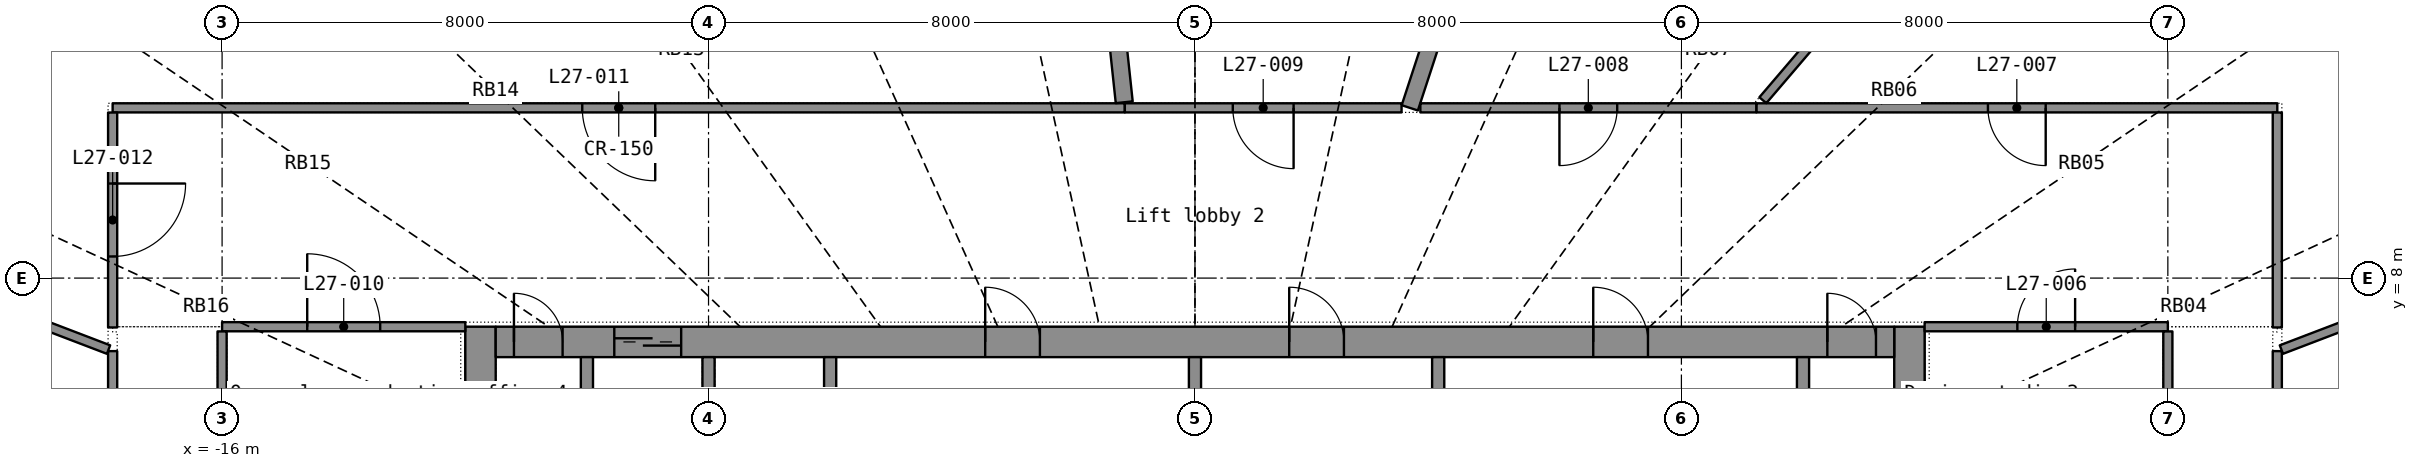
"""IFC4 building model, lengths in metres.
Left out: names, types, materials, properties, quantities, classifications, styles, units other than length and angle.
Written with IfcOpenShell. Run it as: python <this file> out.ifc"""

import sys

from ifc_helpers import new_model, si_unit, direction, frame, frame_2d, origin, place, context, subcontext, project, spatial, rectangle, extrude, element, fill, save


model = new_model("IFC4")
c1 = context("Model", 3, precision=1e-05, world=origin(), true_north=direction((0.0, 1.0)))
c2 = subcontext(c1, "Body", "Model", "MODEL_VIEW")
j1 = project(units=[si_unit("LENGTHUNIT", "METRE"), si_unit("PLANEANGLEUNIT", "RADIAN")], contexts=[c1])
p1 = place(None, origin())
s1 = spatial("IfcSite", under=j1, at=p1, CompositionType="ELEMENT")
p2 = place(p1, origin())
s2 = spatial("IfcBuilding", under=s1, at=p2, CompositionType="ELEMENT")
p3 = place(p2, frame((0.0, 0.0, 115.6)))
s3 = spatial("IfcBuildingStorey", under=s2, at=p3, CompositionType="ELEMENT", Elevation=115.6)
p4 = place(p3, frame((-11.75, -7.2, 0.0), z_axis=(0.0, 0.0, 1.0), x_axis=(0.0, 1.0, 0.0)))
e1 = element("IfcWall", 1, at=p4, inside=s3, PredefinedType="SHEAR", context=c2, shape_type="SweptSolid", body=[
    extrude(rectangle(XDim=14.4, YDim=0.5, at=frame_2d((7.2, 0.0))), origin(), (0.0, 0.0, 1.0), 3.3),
])
p5 = place(p4, frame((6.5, 0.0, 0.0)))
e2 = element("IfcOpeningElement", 2, at=p5, cuts=e1, PredefinedType="OPENING", context=c2, shape_type="SweptSolid", body=[
    extrude(rectangle(XDim=1.4, YDim=2.2, at=frame_2d((0.7, 1.1))), frame((0.0, 0.26, 0.0), z_axis=(0.0, -1.0, 0.0), x_axis=(1.0, 0.0, 0.0)), (0.0, 0.0, 1.0), 0.52),
])
p6 = place(p3, frame((11.75, -7.2, 0.0), z_axis=(0.0, 0.0, 1.0), x_axis=(0.0, 1.0, 0.0)))
e3 = element("IfcWall", 3, at=p6, inside=s3, PredefinedType="SHEAR", context=c2, shape_type="SweptSolid", body=[
    extrude(rectangle(XDim=14.4, YDim=0.5, at=frame_2d((7.2, 0.0))), origin(), (0.0, 0.0, 1.0), 3.3),
])
p7 = place(p6, frame((6.5, 0.0, 0.0)))
e4 = element("IfcOpeningElement", 4, at=p7, cuts=e3, PredefinedType="OPENING", context=c2, shape_type="SweptSolid", body=[
    extrude(rectangle(XDim=1.4, YDim=2.2, at=frame_2d((0.7, 1.1))), frame((0.0, 0.26, 0.0), z_axis=(0.0, -1.0, 0.0), x_axis=(1.0, 0.0, 0.0)), (0.0, 0.0, 1.0), 0.52),
])
p8 = place(p3, frame((-11.5, 6.95, 0.0), z_axis=(0.0, 0.0, 1.0), x_axis=(1.0, 0.0, 0.0)))
e5 = element("IfcWall", 5, at=p8, inside=s3, PredefinedType="SHEAR", context=c2, shape_type="SweptSolid", body=[
    extrude(rectangle(XDim=23.0, YDim=0.5, at=frame_2d((11.5, 0.0))), origin(), (0.0, 0.0, 1.0), 3.3),
])
p9 = place(p8, frame((1.95, 0.0, 0.0)))
e6 = element("IfcOpeningElement", 6, at=p9, cuts=e5, PredefinedType="OPENING", context=c2, shape_type="SweptSolid", body=[
    extrude(rectangle(XDim=1.1, YDim=2.2, at=frame_2d((0.55, 1.1))), frame((0.0, 0.26, 0.0), z_axis=(0.0, -1.0, 0.0), x_axis=(1.0, 0.0, 0.0)), (0.0, 0.0, 1.0), 0.52),
])
p10 = place(p8, frame((8.05, 0.0, 0.0)))
e7 = element("IfcOpeningElement", 7, at=p10, cuts=e5, PredefinedType="OPENING", context=c2, shape_type="SweptSolid", body=[
    extrude(rectangle(XDim=0.9, YDim=2.1, at=frame_2d((0.45, 1.05))), frame((0.0, 0.26, 0.0), z_axis=(0.0, -1.0, 0.0), x_axis=(1.0, 0.0, 0.0)), (0.0, 0.0, 1.0), 0.52),
])
p11 = place(p8, frame((13.05, 0.0, 0.0)))
e8 = element("IfcOpeningElement", 8, at=p11, cuts=e5, PredefinedType="OPENING", context=c2, shape_type="SweptSolid", body=[
    extrude(rectangle(XDim=0.9, YDim=2.1, at=frame_2d((0.45, 1.05))), frame((0.0, 0.26, 0.0), z_axis=(0.0, -1.0, 0.0), x_axis=(1.0, 0.0, 0.0)), (0.0, 0.0, 1.0), 0.52),
])
p12 = place(p8, frame((18.05, 0.0, 0.0)))
e9 = element("IfcOpeningElement", 9, at=p12, cuts=e5, PredefinedType="OPENING", context=c2, shape_type="SweptSolid", body=[
    extrude(rectangle(XDim=0.9, YDim=2.1, at=frame_2d((0.45, 1.05))), frame((0.0, 0.26, 0.0), z_axis=(0.0, -1.0, 0.0), x_axis=(1.0, 0.0, 0.0)), (0.0, 0.0, 1.0), 0.52),
])
p13 = place(p8, frame((0.3, 0.0, 0.0)))
e10 = element("IfcOpeningElement", 10, at=p13, cuts=e5, PredefinedType="OPENING", context=c2, shape_type="SweptSolid", body=[
    extrude(rectangle(XDim=0.8, YDim=2.05, at=frame_2d((0.4, 1.025))), frame((0.0, 0.26, 0.0), z_axis=(0.0, -1.0, 0.0), x_axis=(1.0, 0.0, 0.0)), (0.0, 0.0, 1.0), 0.52),
])
p14 = place(p8, frame((21.9, 0.0, 0.0)))
e11 = element("IfcOpeningElement", 11, at=p14, cuts=e5, PredefinedType="OPENING", context=c2, shape_type="SweptSolid", body=[
    extrude(rectangle(XDim=0.8, YDim=2.05, at=frame_2d((0.4, 1.025))), frame((0.0, 0.26, 0.0), z_axis=(0.0, -1.0, 0.0), x_axis=(1.0, 0.0, 0.0)), (0.0, 0.0, 1.0), 0.52),
])
for number, where, z_axis, x_axis in (
    (12, (-10.0, 3.9, 0.0), (0.0, 0.0, 1.0), (0.0, 1.0, 0.0)),
    (13, (-8.0, 3.9, 0.0), (0.0, 0.0, 1.0), (0.0, 1.0, 0.0)),
    (14, (-6.0, 3.9, 0.0), (0.0, 0.0, 1.0), (0.0, 1.0, 0.0)),
    (15, (10.0, 3.9, 0.0), (0.0, 0.0, 1.0), (0.0, 1.0, 0.0)),
):
    element("IfcWall", number, at=place(p3, frame(where, z_axis=z_axis, x_axis=x_axis)), inside=s3, PredefinedType="SHEAR", context=c2, shape_type="SweptSolid", body=[
        extrude(rectangle(XDim=2.8, YDim=0.2, at=frame_2d((1.4, 0.0))), origin(), (0.0, 0.0, 1.0), 3.3),
    ])
for number, where, z_axis, x_axis in (
    (16, (0.0, 3.9, 0.0), (0.0, 0.0, 1.0), (0.0, 1.0, 0.0)),
    (17, (4.0, 3.9, 0.0), (0.0, 0.0, 1.0), (0.0, 1.0, 0.0)),
):
    element("IfcWall", number, at=place(p3, frame(where, z_axis=z_axis, x_axis=x_axis)), inside=s3, PredefinedType="PARTITIONING", context=c2, shape_type="SweptSolid", body=[
        extrude(rectangle(XDim=2.8, YDim=0.2, at=frame_2d((1.4, 0.0))), origin(), (0.0, 0.0, 1.0), 3.3),
    ])
p15 = place(p3, frame((-1.154, 10.8, 0.0), z_axis=(0.0, 0.0, 1.0), x_axis=(-1.0, 0.0, 0.0)))
e18 = element("IfcWall", 18, at=p15, inside=s3, PredefinedType="PARTITIONING", context=c2, shape_type="SweptSolid", body=[
    extrude(rectangle(XDim=16.646, YDim=0.15, at=frame_2d((8.323, 0.0))), origin(), (0.0, 0.0, 1.0), 2.4),
])
p16 = place(p15, frame((7.723, 0.0, 0.0)))
e19 = element("IfcOpeningElement", 19, at=p16, cuts=e18, PredefinedType="OPENING", context=c2, shape_type="SweptSolid", body=[
    extrude(rectangle(XDim=1.2, YDim=2.2, at=frame_2d((0.6, 1.1))), frame((0.0, 0.085, 0.0), z_axis=(0.0, -1.0, 0.0), x_axis=(1.0, 0.0, 0.0)), (0.0, 0.0, 1.0), 0.17),
])
p17 = place(p3, frame((17.8, -6.799, 0.0), z_axis=(0.0, 0.0, 1.0), x_axis=(0.0, 1.0, 0.0)))
e20 = element("IfcWall", 20, at=p17, inside=s3, PredefinedType="PARTITIONING", context=c2, shape_type="SweptSolid", body=[
    extrude(rectangle(XDim=13.598, YDim=0.15, at=frame_2d((6.799, 0.0))), origin(), (0.0, 0.0, 1.0), 2.4),
])
p18 = place(p17, frame((6.199, 0.0, 0.0)))
e21 = element("IfcOpeningElement", 21, at=p18, cuts=e20, PredefinedType="OPENING", context=c2, shape_type="SweptSolid", body=[
    extrude(rectangle(XDim=1.2, YDim=2.2, at=frame_2d((0.6, 1.1))), frame((0.0, 0.085, 0.0), z_axis=(0.0, -1.0, 0.0), x_axis=(1.0, 0.0, 0.0)), (0.0, 0.0, 1.0), 0.17),
])
p19 = place(p3, frame((-17.8, 6.799, 0.0), z_axis=(0.0, 0.0, 1.0), x_axis=(0.0, -1.0, 0.0)))
e22 = element("IfcWall", 22, at=p19, inside=s3, PredefinedType="PARTITIONING", context=c2, shape_type="SweptSolid", body=[
    extrude(rectangle(XDim=10.706, YDim=0.15, at=frame_2d((5.353, 0.0))), origin(), (0.0, 0.0, 1.0), 2.4),
])
p20 = place(p19, frame((4.753, 0.0, 0.0)))
e23 = element("IfcOpeningElement", 23, at=p20, cuts=e22, PredefinedType="OPENING", context=c2, shape_type="SweptSolid", body=[
    extrude(rectangle(XDim=1.2, YDim=2.2, at=frame_2d((0.6, 1.1))), frame((0.0, 0.085, 0.0), z_axis=(0.0, -1.0, 0.0), x_axis=(1.0, 0.0, 0.0)), (0.0, 0.0, 1.0), 0.17),
])
p21 = place(p3, frame((-2.219, 20.775, 0.0), z_axis=(0.0, 0.0, 1.0), x_axis=(0.106213943, -0.9943433, 0.0)))
e24 = element("IfcWall", 24, at=p21, inside=s3, PredefinedType="PARTITIONING", context=c2, shape_type="SweptSolid", body=[
    extrude(rectangle(XDim=9.939, YDim=0.28, at=frame_2d((4.969, 0.0))), origin(), (0.0, 0.0, 1.0), 2.4),
])
p22 = place(p21, frame((4.219, 0.0, 1.0)))
e25 = element("IfcOpeningElement", 25, at=p22, cuts=e24, PredefinedType="OPENING", context=c2, shape_type="SweptSolid", body=[
    extrude(rectangle(XDim=1.5, YDim=1.2, at=frame_2d((0.75, 0.6))), frame((0.0, 0.15, 0.0), z_axis=(0.0, -1.0, 0.0), x_axis=(1.0, 0.0, 0.0)), (0.0, 0.0, 1.0), 0.3),
])
p23 = place(p3, frame((6.59, 20.144, 0.0), z_axis=(0.0, 0.0, 1.0), x_axis=(-0.310918337, -0.95043663, 0.0)))
e26 = element("IfcWall", 26, at=p23, inside=s3, PredefinedType="PARTITIONING", context=c2, shape_type="SweptSolid", body=[
    extrude(rectangle(XDim=9.831, YDim=0.28, at=frame_2d((4.916, 0.0))), origin(), (0.0, 0.0, 1.0), 2.4),
])
p24 = place(p3, frame((17.8, 10.8, 0.0), z_axis=(0.0, 0.0, 1.0), x_axis=(-1.0, 0.0, 0.0)))
e27 = element("IfcWall", 27, at=p24, inside=s3, PredefinedType="PARTITIONING", context=c2, shape_type="SweptSolid", body=[
    extrude(rectangle(XDim=8.568, YDim=0.15, at=frame_2d((4.284, 0.0))), origin(), (0.0, 0.0, 1.0), 2.4),
])
p25 = place(p24, frame((3.809, 0.0, 0.0)))
e28 = element("IfcOpeningElement", 28, at=p25, cuts=e27, PredefinedType="OPENING", context=c2, shape_type="SweptSolid", body=[
    extrude(rectangle(XDim=0.95, YDim=2.15, at=frame_2d((0.475, 1.075))), frame((0.0, 0.085, 0.0), z_axis=(0.0, -1.0, 0.0), x_axis=(1.0, 0.0, 0.0)), (0.0, 0.0, 1.0), 0.17),
])
p26 = place(p3, frame((14.607, 17.087, 0.0), z_axis=(0.0, 0.0, 1.0), x_axis=(-0.649776378, -0.760125423, 0.0)))
e29 = element("IfcWall", 29, at=p26, inside=s3, PredefinedType="PARTITIONING", context=c2, shape_type="SweptSolid", body=[
    extrude(rectangle(XDim=8.106, YDim=0.15, at=frame_2d((4.053, 0.0))), origin(), (0.0, 0.0, 1.0), 2.4),
])
p27 = place(p3, frame((9.231, 10.8, 0.0), z_axis=(0.0, 0.0, 1.0), x_axis=(-1.0, 0.0, 0.0)))
e30 = element("IfcWall", 30, at=p27, inside=s3, PredefinedType="PARTITIONING", context=c2, shape_type="SweptSolid", body=[
    extrude(rectangle(XDim=5.524, YDim=0.15, at=frame_2d((2.762, 0.0))), origin(), (0.0, 0.0, 1.0), 2.4),
])
p28 = place(p27, frame((2.287, 0.0, 0.0)))
e31 = element("IfcOpeningElement", 31, at=p28, cuts=e30, PredefinedType="OPENING", context=c2, shape_type="SweptSolid", body=[
    extrude(rectangle(XDim=0.95, YDim=2.15, at=frame_2d((0.475, 1.075))), frame((0.0, 0.085, 0.0), z_axis=(0.0, -1.0, 0.0), x_axis=(1.0, 0.0, 0.0)), (0.0, 0.0, 1.0), 0.17),
])
p29 = place(p3, frame((-23.094, 8.821, 0.0), z_axis=(0.0, 0.0, 1.0), x_axis=(0.934174226, -0.356817201, 0.0)))
e32 = element("IfcWall", 32, at=p29, inside=s3, PredefinedType="PARTITIONING", context=c2, shape_type="SweptSolid", body=[
    extrude(rectangle(XDim=5.595, YDim=0.15, at=frame_2d((2.797, 0.0))), origin(), (0.0, 0.0, 1.0), 2.4),
])
p30 = place(p3, frame((23.092, 8.82, 0.0), z_axis=(0.0, 0.0, 1.0), x_axis=(-0.934164423, -0.356842865, 0.0)))
e33 = element("IfcWall", 33, at=p30, inside=s3, PredefinedType="PARTITIONING", context=c2, shape_type="SweptSolid", body=[
    extrude(rectangle(XDim=5.593, YDim=0.15, at=frame_2d((2.796, 0.0))), origin(), (0.0, 0.0, 1.0), 2.4),
])
p31 = place(p3, frame((3.398, 10.8, 0.0), z_axis=(0.0, 0.0, 1.0), x_axis=(-1.0, 0.0, 0.0)))
e34 = element("IfcWall", 34, at=p31, inside=s3, PredefinedType="PARTITIONING", context=c2, shape_type="SweptSolid", body=[
    extrude(rectangle(XDim=4.551, YDim=0.15, at=frame_2d((2.276, 0.0))), origin(), (0.0, 0.0, 1.0), 2.4),
])
p32 = place(p31, frame((1.776, 0.0, 0.0)))
e35 = element("IfcOpeningElement", 35, at=p32, cuts=e34, PredefinedType="OPENING", context=c2, shape_type="SweptSolid", body=[
    extrude(rectangle(XDim=1.0, YDim=2.2, at=frame_2d((0.5, 1.1))), frame((0.0, 0.085, 0.0), z_axis=(0.0, -1.0, 0.0), x_axis=(1.0, 0.0, 0.0)), (0.0, 0.0, 1.0), 0.17),
])
p33 = place(p3, frame((-16.0, 7.2, 0.0), z_axis=(0.0, 0.0, 1.0), x_axis=(1.0, 0.0, 0.0)))
e36 = element("IfcWall", 36, at=p33, inside=s3, PredefinedType="PARTITIONING", context=c2, shape_type="SweptSolid", body=[
    extrude(rectangle(XDim=4.0, YDim=0.15, at=frame_2d((2.0, 0.0))), origin(), (0.0, 0.0, 1.0), 2.4),
])
p34 = place(p33, frame((1.4, 0.0, 0.0)))
e37 = element("IfcOpeningElement", 37, at=p34, cuts=e36, PredefinedType="OPENING", context=c2, shape_type="SweptSolid", body=[
    extrude(rectangle(XDim=1.2, YDim=2.2, at=frame_2d((0.6, 1.1))), frame((0.0, 0.085, 0.0), z_axis=(0.0, -1.0, 0.0), x_axis=(1.0, 0.0, 0.0)), (0.0, 0.0, 1.0), 0.17),
])
p35 = place(p3, frame((12.0, 7.2, 0.0), z_axis=(0.0, 0.0, 1.0), x_axis=(1.0, 0.0, 0.0)))
e38 = element("IfcWall", 38, at=p35, inside=s3, PredefinedType="PARTITIONING", context=c2, shape_type="SweptSolid", body=[
    extrude(rectangle(XDim=4.0, YDim=0.15, at=frame_2d((2.0, 0.0))), origin(), (0.0, 0.0, 1.0), 2.4),
])
p36 = place(p35, frame((1.525, 0.0, 0.0)))
e39 = element("IfcOpeningElement", 39, at=p36, cuts=e38, PredefinedType="OPENING", context=c2, shape_type="SweptSolid", body=[
    extrude(rectangle(XDim=0.95, YDim=2.15, at=frame_2d((0.475, 1.075))), frame((0.0, 0.085, 0.0), z_axis=(0.0, -1.0, 0.0), x_axis=(1.0, 0.0, 0.0)), (0.0, 0.0, 1.0), 0.17),
])
p37 = place(p3, frame((-17.8, 10.723, 0.0), z_axis=(0.0, 0.0, 1.0), x_axis=(0.0, -1.0, 0.0)))
e40 = element("IfcWall", 40, at=p37, inside=s3, PredefinedType="PARTITIONING", context=c2, shape_type="SweptSolid", body=[
    extrude(rectangle(XDim=3.535, YDim=0.15, at=frame_2d((1.768, 0.0))), origin(), (0.0, 0.0, 1.0), 2.4),
])
p38 = place(p37, frame((1.167, 0.0, 0.0)))
e41 = element("IfcOpeningElement", 41, at=p38, cuts=e40, PredefinedType="OPENING", context=c2, shape_type="SweptSolid", body=[
    extrude(rectangle(XDim=1.2, YDim=2.2, at=frame_2d((0.6, 1.1))), frame((0.0, 0.085, 0.0), z_axis=(0.0, -1.0, 0.0), x_axis=(1.0, 0.0, 0.0)), (0.0, 0.0, 1.0), 0.17),
])
p39 = place(p3, frame((17.8, 7.188, 0.0), z_axis=(0.0, 0.0, 1.0), x_axis=(0.0, 1.0, 0.0)))
e42 = element("IfcWall", 42, at=p39, inside=s3, PredefinedType="PARTITIONING", context=c2, shape_type="SweptSolid", body=[
    extrude(rectangle(XDim=3.535, YDim=0.15, at=frame_2d((1.768, 0.0))), origin(), (0.0, 0.0, 1.0), 2.4),
])
for number, where, z_axis, x_axis in (
    (43, (-16.0, 6.112, 0.0), (0.0, 0.0, 1.0), (0.0, 1.0, 0.0)),
    (44, (16.0, 7.123, 0.0), (0.0, 0.0, 1.0), (0.0, -1.0, 0.0)),
):
    element("IfcWall", number, at=place(p3, frame(where, z_axis=z_axis, x_axis=x_axis)), inside=s3, PredefinedType="PARTITIONING", context=c2, shape_type="SweptSolid", body=[
        extrude(rectangle(XDim=1.011, YDim=0.15, at=frame_2d((0.505, 0.0))), origin(), (0.0, 0.0, 1.0), 2.4),
    ])
p40 = place(p9, origin())
e45 = element("IfcDoor", 45, at=p40, inside=s3, OperationType="DOUBLE_DOOR_SLIDING", PredefinedType="DOOR", context=c2, shape_type="SweptSolid", body=[
    extrude(rectangle(XDim=1.1, YDim=2.2, at=frame_2d((0.55, 1.1))), frame((0.0, 0.025, 0.0), z_axis=(0.0, -1.0, 0.0), x_axis=(1.0, 0.0, 0.0)), (0.0, 0.0, 1.0), 0.05),
])
fill(e6, e45)
p41 = place(p10, origin())
e46 = element("IfcDoor", 46, at=p41, inside=s3, OperationType="SINGLE_SWING_LEFT", PredefinedType="DOOR", context=c2, shape_type="SweptSolid", body=[
    extrude(rectangle(XDim=0.9, YDim=2.1, at=frame_2d((0.45, 1.05))), frame((0.0, 0.025, 0.0), z_axis=(0.0, -1.0, 0.0), x_axis=(1.0, 0.0, 0.0)), (0.0, 0.0, 1.0), 0.05),
])
fill(e7, e46)
p42 = place(p11, origin())
e47 = element("IfcDoor", 47, at=p42, inside=s3, OperationType="SINGLE_SWING_LEFT", PredefinedType="DOOR", context=c2, shape_type="SweptSolid", body=[
    extrude(rectangle(XDim=0.9, YDim=2.1, at=frame_2d((0.45, 1.05))), frame((0.0, 0.025, 0.0), z_axis=(0.0, -1.0, 0.0), x_axis=(1.0, 0.0, 0.0)), (0.0, 0.0, 1.0), 0.05),
])
fill(e8, e47)
p43 = place(p12, origin())
e48 = element("IfcDoor", 48, at=p43, inside=s3, OperationType="SINGLE_SWING_LEFT", PredefinedType="DOOR", context=c2, shape_type="SweptSolid", body=[
    extrude(rectangle(XDim=0.9, YDim=2.1, at=frame_2d((0.45, 1.05))), frame((0.0, 0.025, 0.0), z_axis=(0.0, -1.0, 0.0), x_axis=(1.0, 0.0, 0.0)), (0.0, 0.0, 1.0), 0.05),
])
fill(e9, e48)
p44 = place(p13, origin())
e49 = element("IfcDoor", 49, at=p44, inside=s3, OperationType="SINGLE_SWING_LEFT", PredefinedType="DOOR", context=c2, shape_type="SweptSolid", body=[
    extrude(rectangle(XDim=0.8, YDim=2.05, at=frame_2d((0.4, 1.025))), frame((0.0, 0.025, 0.0), z_axis=(0.0, -1.0, 0.0), x_axis=(1.0, 0.0, 0.0)), (0.0, 0.0, 1.0), 0.05),
])
fill(e10, e49)
p45 = place(p14, origin())
e50 = element("IfcDoor", 50, at=p45, inside=s3, OperationType="SINGLE_SWING_LEFT", PredefinedType="DOOR", context=c2, shape_type="SweptSolid", body=[
    extrude(rectangle(XDim=0.8, YDim=2.05, at=frame_2d((0.4, 1.025))), frame((0.0, 0.025, 0.0), z_axis=(0.0, -1.0, 0.0), x_axis=(1.0, 0.0, 0.0)), (0.0, 0.0, 1.0), 0.05),
])
fill(e11, e50)
p46 = place(p36, origin())
e51 = element("IfcDoor", 51, at=p46, inside=s3, OperationType="SINGLE_SWING_RIGHT", PredefinedType="DOOR", context=c2, shape_type="SweptSolid", body=[
    extrude(rectangle(XDim=0.95, YDim=2.15, at=frame_2d((0.475, 1.075))), frame((0.0, 0.025, 0.0), z_axis=(0.0, -1.0, 0.0), x_axis=(1.0, 0.0, 0.0)), (0.0, 0.0, 1.0), 0.05),
])
fill(e39, e51)
p47 = place(p25, origin())
e52 = element("IfcDoor", 52, at=p47, inside=s3, OperationType="SINGLE_SWING_LEFT", PredefinedType="DOOR", context=c2, shape_type="SweptSolid", body=[
    extrude(rectangle(XDim=0.95, YDim=2.15, at=frame_2d((0.475, 1.075))), frame((0.0, 0.025, 0.0), z_axis=(0.0, -1.0, 0.0), x_axis=(1.0, 0.0, 0.0)), (0.0, 0.0, 1.0), 0.05),
])
fill(e28, e52)
p48 = place(p28, origin())
e53 = element("IfcDoor", 53, at=p48, inside=s3, OperationType="SINGLE_SWING_RIGHT", PredefinedType="DOOR", context=c2, shape_type="SweptSolid", body=[
    extrude(rectangle(XDim=0.95, YDim=2.15, at=frame_2d((0.475, 1.075))), frame((0.0, 0.025, 0.0), z_axis=(0.0, -1.0, 0.0), x_axis=(1.0, 0.0, 0.0)), (0.0, 0.0, 1.0), 0.05),
])
fill(e31, e53)
p49 = place(p32, origin())
e54 = element("IfcDoor", 54, at=p49, inside=s3, OperationType="SINGLE_SWING_LEFT", PredefinedType="DOOR", context=c2, shape_type="SweptSolid", body=[
    extrude(rectangle(XDim=1.0, YDim=2.2, at=frame_2d((0.5, 1.1))), frame((0.0, 0.025, 0.0), z_axis=(0.0, -1.0, 0.0), x_axis=(1.0, 0.0, 0.0)), (0.0, 0.0, 1.0), 0.05),
])
fill(e35, e54)
p50 = place(p34, origin())
e55 = element("IfcDoor", 55, at=p50, inside=s3, OperationType="DOUBLE_DOOR_SINGLE_SWING", PredefinedType="DOOR", context=c2, shape_type="SweptSolid", body=[
    extrude(rectangle(XDim=1.2, YDim=2.2, at=frame_2d((0.6, 1.1))), frame((0.0, 0.025, 0.0), z_axis=(0.0, -1.0, 0.0), x_axis=(1.0, 0.0, 0.0)), (0.0, 0.0, 1.0), 0.05),
])
fill(e37, e55)
p51 = place(p16, origin())
e56 = element("IfcDoor", 56, at=p51, inside=s3, OperationType="DOUBLE_DOOR_SINGLE_SWING", PredefinedType="DOOR", context=c2, shape_type="SweptSolid", body=[
    extrude(rectangle(XDim=1.2, YDim=2.2, at=frame_2d((0.6, 1.1))), frame((0.0, 0.025, 0.0), z_axis=(0.0, -1.0, 0.0), x_axis=(1.0, 0.0, 0.0)), (0.0, 0.0, 1.0), 0.05),
])
fill(e19, e56)
p52 = place(p38, origin())
e57 = element("IfcDoor", 57, at=p52, inside=s3, OperationType="DOUBLE_DOOR_SINGLE_SWING", PredefinedType="DOOR", context=c2, shape_type="SweptSolid", body=[
    extrude(rectangle(XDim=1.2, YDim=2.2, at=frame_2d((0.6, 1.1))), frame((0.0, 0.025, 0.0), z_axis=(0.0, -1.0, 0.0), x_axis=(1.0, 0.0, 0.0)), (0.0, 0.0, 1.0), 0.05),
])
fill(e41, e57)
save(model, sys.argv[1])
